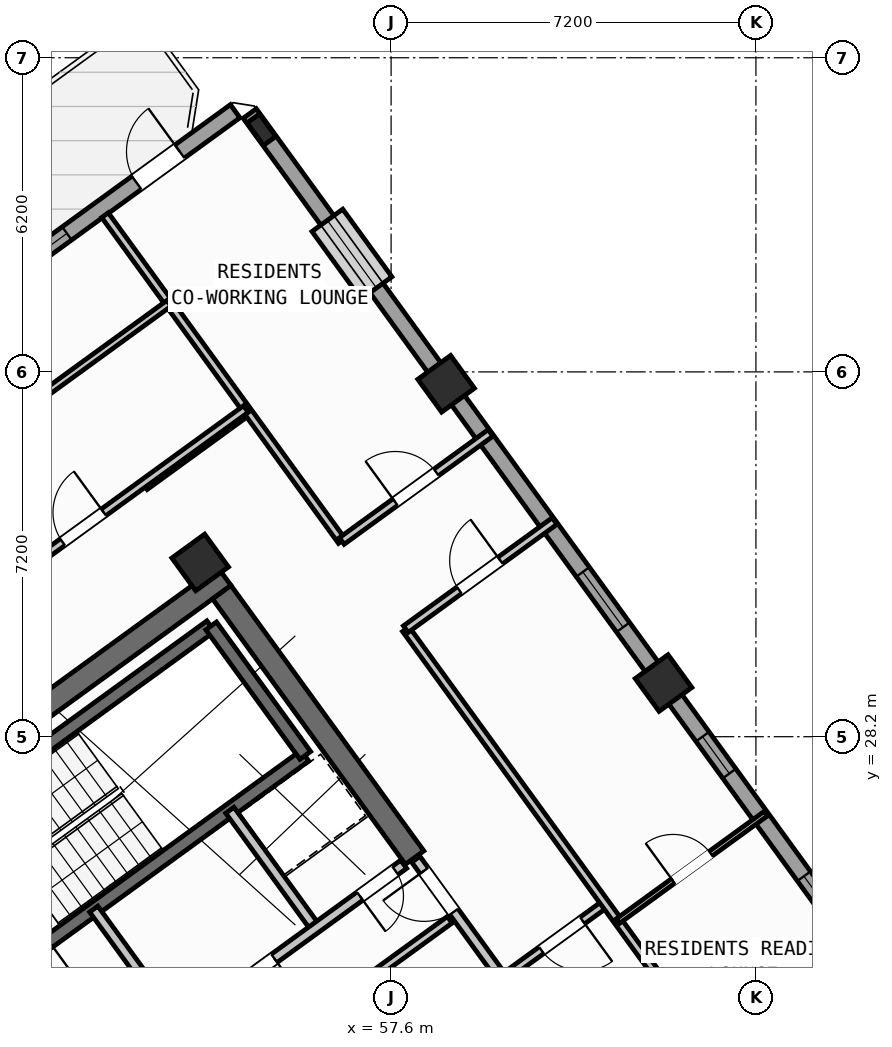
"""IFC4 building model, lengths in metres.
Left out: names, types, materials, properties, quantities, classifications, styles, units other than length and angle.
Written with IfcOpenShell. Run it as: python <this file> out.ifc"""

import sys

from ifc_helpers import new_model, si_unit, direction, frame, frame_2d, origin, origin_2d, place, context, subcontext, project, spatial, rectangle, hollow_rectangle, i_section, extrude, source, transform, mapped, element, fill, save


model = new_model("IFC4")
c1 = context("Model", 3, precision=1e-05, world=origin(), true_north=direction((0.0, 1.0)))
c2 = subcontext(c1, "Body", "Model", "MODEL_VIEW")
j1 = project(units=[si_unit("LENGTHUNIT", "METRE"), si_unit("PLANEANGLEUNIT", "RADIAN")], contexts=[c1])
p1 = place(None, origin())
s1 = spatial("IfcSite", under=j1, at=p1, CompositionType="ELEMENT")
p2 = place(p1, origin())
s2 = spatial("IfcBuilding", under=s1, at=p2, CompositionType="ELEMENT")
p3 = place(p2, frame((0.0, 0.0, 218.4)))
s3 = spatial("IfcBuildingStorey", under=s2, at=p3, CompositionType="ELEMENT", Elevation=218.4)
p4 = place(p3, frame((44.406, 24.172, 0.0), z_axis=(0.0, 0.0, 1.0), x_axis=(0.809012867805, 0.587790931986, 0.0)))
e1 = element("IfcWall", 1, at=p4, inside=s3, PredefinedType="SHEAR", context=c2, shape_type="SweptSolid", body=[
    extrude(rectangle(XDim=12.24, YDim=0.45, at=frame_2d((6.12, 0.0))), origin(), (0.0, 0.0, 1.0), 3.35),
])
p5 = place(p3, frame((58.064, 25.813, 0.0), z_axis=(0.0, 0.0, 1.0), x_axis=(-0.587774812919, 0.809024578921, 0.0)))
e2 = element("IfcWall", 2, at=p5, inside=s3, PredefinedType="SHEAR", context=c2, shape_type="SweptSolid", body=[
    extrude(rectangle(XDim=6.475, YDim=0.45, at=frame_2d((3.238, 0.0))), origin(), (0.0, 0.0, 1.0), 3.35),
])
m1 = source(origin(), c2, "Body", "SweptSolid", [
    extrude(hollow_rectangle(XDim=0.8, YDim=0.8, WallThickness=0.032, at=origin_2d()), origin(), (0.0, 0.0, 1.0), 3.6),
])
for number, where, z_axis, x_axis in (
    (3, (53.832, 31.638, 0.0), (0.0, 0.0, 1.0), (0.809, 0.588, 0.0)),
    (4, (62.977, 29.259, 0.0), (0.0, 0.0, 1.0), (0.809, 0.588, 0.0)),
    (5, (58.686, 35.165, 0.0), (0.0, 0.0, 1.0), (0.809, 0.588, 0.0)),
):
    element("IfcColumn", number, at=place(p3, frame(where, z_axis=z_axis, x_axis=x_axis)), inside=s3, PredefinedType="COLUMN", context=c2, shape_type="MappedRepresentation", body=[
        mapped(m1, transform((0.0, 0.0, 0.0), scale=1.0)),
    ])
m2 = source(origin(), c2, "Body", "SweptSolid", [
    extrude(i_section(OverallWidth=0.3, OverallDepth=0.55, WebThickness=0.015, FlangeThickness=0.029, at=origin_2d()), origin(), (0.0, 0.0, 1.0), 3.6),
])
p6 = place(p3, frame((55.042, 40.181, 0.0), z_axis=(0.0, 0.0, 1.0), x_axis=(0.809016994375, 0.587785252292, 0.0)))
e6 = element("IfcColumn", 6, at=p6, inside=s3, PredefinedType="COLUMN", context=c2, shape_type="MappedRepresentation", body=[
    mapped(m2, transform((0.0, 0.0, 0.0), scale=1.0)),
])
p7 = place(p3, frame((42.207, 31.597, 0.0), z_axis=(0.0, 0.0, 1.0), x_axis=(0.809020333377, 0.587780656523, 0.0)))
e7 = element("IfcWall", 7, at=p7, inside=s3, PredefinedType="STANDARD", context=c2, shape_type="SweptSolid", body=[
    extrude(rectangle(XDim=15.223, YDim=0.32, at=frame_2d((7.611, 0.0))), origin(), (0.0, 0.0, 1.0), 3.35),
])
p8 = place(p7, frame((12.82, 0.0, 0.0)))
e8 = element("IfcOpeningElement", 8, at=p8, cuts=e7, PredefinedType="OPENING", context=c2, shape_type="SweptSolid", body=[
    extrude(rectangle(XDim=1.05, YDim=2.15, at=frame_2d((0.525, 1.075))), frame((0.0, 0.17, 0.0), z_axis=(0.0, -1.0, 0.0), x_axis=(1.0, 0.0, 0.0)), (0.0, 0.0, 1.0), 0.34),
])
p9 = place(p7, frame((1.745, 0.0, 0.9)))
e9 = element("IfcOpeningElement", 9, at=p9, cuts=e7, PredefinedType="OPENING", context=c2, shape_type="SweptSolid", body=[
    extrude(rectangle(XDim=1.65, YDim=1.45, at=frame_2d((0.825, 0.725))), frame((0.0, 0.17, 0.0), z_axis=(0.0, -1.0, 0.0), x_axis=(1.0, 0.0, 0.0)), (0.0, 0.0, 1.0), 0.34),
])
p10 = place(p7, frame((5.985, 0.0, 0.9)))
e10 = element("IfcOpeningElement", 10, at=p10, cuts=e7, PredefinedType="OPENING", context=c2, shape_type="SweptSolid", body=[
    extrude(rectangle(XDim=1.65, YDim=1.45, at=frame_2d((0.825, 0.725))), frame((0.0, 0.17, 0.0), z_axis=(0.0, -1.0, 0.0), x_axis=(1.0, 0.0, 0.0)), (0.0, 0.0, 1.0), 0.34),
])
p11 = place(p7, frame((10.219, 0.0, 1.0)))
e11 = element("IfcOpeningElement", 11, at=p11, cuts=e7, PredefinedType="OPENING", context=c2, shape_type="SweptSolid", body=[
    extrude(rectangle(XDim=0.9, YDim=1.25, at=frame_2d((0.45, 0.625))), frame((0.0, 0.17, 0.0), z_axis=(0.0, -1.0, 0.0), x_axis=(1.0, 0.0, 0.0)), (0.0, 0.0, 1.0), 0.34),
])
p12 = place(p3, frame((54.81, 40.5, 0.0), z_axis=(0.0, 0.0, 1.0), x_axis=(0.587783625747, -0.809018176127, 0.0)))
e12 = element("IfcWall", 12, at=p12, inside=s3, PredefinedType="STANDARD", context=c2, shape_type="SweptSolid", body=[
    extrude(rectangle(XDim=21.587, YDim=0.32, at=frame_2d((10.794, 0.0))), origin(), (0.0, 0.0, 1.0), 2.825),
])
p13 = place(p12, frame((2.606, 0.0, 0.9)))
e13 = element("IfcOpeningElement", 13, at=p13, cuts=e12, PredefinedType="OPENING", context=c2, shape_type="SweptSolid", body=[
    extrude(rectangle(XDim=1.65, YDim=1.45, at=frame_2d((0.825, 0.725))), frame((0.0, 0.17, 0.0), z_axis=(0.0, -1.0, 0.0), x_axis=(1.0, 0.0, 0.0)), (0.0, 0.0, 1.0), 0.34),
])
p14 = place(p12, frame((11.184, 0.0, 0.9)))
e14 = element("IfcOpeningElement", 14, at=p14, cuts=e12, PredefinedType="OPENING", context=c2, shape_type="SweptSolid", body=[
    extrude(rectangle(XDim=1.35, YDim=1.45, at=frame_2d((0.675, 0.725))), frame((0.0, 0.17, 0.0), z_axis=(0.0, -1.0, 0.0), x_axis=(1.0, 0.0, 0.0)), (0.0, 0.0, 1.0), 0.34),
])
p15 = place(p12, frame((15.202, 0.0, 1.0)))
e15 = element("IfcOpeningElement", 15, at=p15, cuts=e12, PredefinedType="OPENING", context=c2, shape_type="SweptSolid", body=[
    extrude(rectangle(XDim=0.9, YDim=1.25, at=frame_2d((0.45, 0.625))), frame((0.0, 0.17, 0.0), z_axis=(0.0, -1.0, 0.0), x_axis=(1.0, 0.0, 0.0)), (0.0, 0.0, 1.0), 0.34),
])
p16 = place(p12, frame((18.607, 0.0, 1.0)))
e16 = element("IfcOpeningElement", 16, at=p16, cuts=e12, PredefinedType="OPENING", context=c2, shape_type="SweptSolid", body=[
    extrude(rectangle(XDim=0.9, YDim=1.25, at=frame_2d((0.45, 0.625))), frame((0.0, 0.17, 0.0), z_axis=(0.0, -1.0, 0.0), x_axis=(1.0, 0.0, 0.0)), (0.0, 0.0, 1.0), 0.34),
])
p17 = place(p3, frame((48.006, 25.996, 0.0), z_axis=(0.0, 0.0, 1.0), x_axis=(0.80901903764, 0.587782439969, 0.0)))
e17 = element("IfcWall", 17, at=p17, inside=s3, PredefinedType="SHEAR", context=c2, shape_type="SweptSolid", body=[
    extrude(rectangle(XDim=7.46, YDim=0.26, at=frame_2d((3.73, 0.0))), origin(), (0.0, 0.0, 1.0), 3.35),
])
p18 = place(p3, frame((49.863, 23.44, 0.0), z_axis=(0.0, 0.0, 1.0), x_axis=(0.809003474932, 0.587803859759, 0.0)))
e18 = element("IfcWall", 18, at=p18, inside=s3, PredefinedType="SHEAR", context=c2, shape_type="SweptSolid", body=[
    extrude(rectangle(XDim=7.46, YDim=0.26, at=frame_2d((3.73, 0.0))), origin(), (0.0, 0.0, 1.0), 3.35),
])
p19 = place(p18, frame((0.36, 0.0, 0.0)))
e19 = element("IfcOpeningElement", 19, at=p19, cuts=e18, PredefinedType="OPENING", context=c2, shape_type="SweptSolid", body=[
    extrude(rectangle(XDim=0.86, YDim=2.05, at=frame_2d((0.43, 1.025))), frame((0.0, 0.14, 0.0), z_axis=(0.0, -1.0, 0.0), x_axis=(1.0, 0.0, 0.0)), (0.0, 0.0, 1.0), 0.28),
])
p20 = place(p3, frame((55.906, 27.831, 0.0), z_axis=(0.0, 0.0, 1.0), x_axis=(-0.587804123638, 0.809003283204, 0.0)))
e20 = element("IfcWall", 20, at=p20, inside=s3, PredefinedType="SHEAR", context=c2, shape_type="SweptSolid", body=[
    extrude(rectangle(XDim=3.16, YDim=0.26, at=frame_2d((1.58, 0.0))), origin(), (0.0, 0.0, 1.0), 3.35),
])
p21 = place(p3, frame((54.421, 21.436, 0.0), z_axis=(0.0, 0.0, 1.0), x_axis=(0.809013710463, 0.587789772183, 0.0)))
e21 = element("IfcWall", 21, at=p21, inside=s3, PredefinedType="PARTITIONING", context=c2, shape_type="SweptSolid", body=[
    extrude(rectangle(XDim=5.36, YDim=0.16, at=frame_2d((2.68, 0.0))), origin(), (0.0, 0.0, 1.0), 3.34),
])
p22 = place(p21, frame((1.4, 0.0, 0.0)))
e22 = element("IfcOpeningElement", 22, at=p22, cuts=e21, PredefinedType="OPENING", context=c2, shape_type="SweptSolid", body=[
    extrude(rectangle(XDim=0.86, YDim=2.05, at=frame_2d((0.43, 1.025))), frame((0.0, 0.09, 0.0), z_axis=(0.0, -1.0, 0.0), x_axis=(1.0, 0.0, 0.0)), (0.0, 0.0, 1.0), 0.18),
])
p23 = place(p3, frame((53.425, 22.468, 0.0), z_axis=(0.0, 0.0, 1.0), x_axis=(-0.5877230039, 0.809062216821, 0.0)))
e23 = element("IfcWall", 23, at=p23, inside=s3, PredefinedType="STANDARD", context=c2, shape_type="SweptSolid", body=[
    extrude(rectangle(XDim=2.88, YDim=0.2, at=frame_2d((1.44, 0.0))), origin(), (0.0, 0.0, 1.0), 3.34),
])
p24 = place(p3, frame((56.111, 24.419, 0.0), z_axis=(0.0, 0.0, 1.0), x_axis=(-0.58777848983, 0.809021907548, 0.0)))
e24 = element("IfcWall", 24, at=p24, inside=s3, PredefinedType="STANDARD", context=c2, shape_type="SweptSolid", body=[
    extrude(rectangle(XDim=2.88, YDim=0.2, at=frame_2d((1.44, 0.0))), origin(), (0.0, 0.0, 1.0), 3.34),
])
p25 = place(p3, frame((53.425, 22.468, 0.0), z_axis=(0.0, 0.0, 1.0), x_axis=(0.809015945709, 0.587786695655, 0.0)))
e25 = element("IfcWall", 25, at=p25, inside=s3, PredefinedType="STANDARD", context=c2, shape_type="SweptSolid", body=[
    extrude(rectangle(XDim=5.468, YDim=0.2, at=frame_2d((2.734, 0.0))), origin(), (0.0, 0.0, 1.0), 3.34),
])
p26 = place(p25, frame((4.4, 0.0, 0.0)))
e26 = element("IfcOpeningElement", 26, at=p26, cuts=e25, PredefinedType="OPENING", context=c2, shape_type="SweptSolid", body=[
    extrude(rectangle(XDim=0.86, YDim=2.05, at=frame_2d((0.43, 1.025))), frame((0.0, 0.11, 0.0), z_axis=(0.0, -1.0, 0.0), x_axis=(1.0, 0.0, 0.0)), (0.0, 0.0, 1.0), 0.22),
])
p27 = place(p25, frame((1.45, 0.0, 0.0)))
e27 = element("IfcOpeningElement", 27, at=p27, cuts=e25, PredefinedType="OPENING", context=c2, shape_type="SweptSolid", body=[
    extrude(rectangle(XDim=0.86, YDim=2.05, at=frame_2d((0.43, 1.025))), frame((0.0, 0.11, 0.0), z_axis=(0.0, -1.0, 0.0), x_axis=(1.0, 0.0, 0.0)), (0.0, 0.0, 1.0), 0.22),
])
p28 = place(p3, frame((59.827, 23.386, 0.0), z_axis=(0.0, 0.0, 1.0), x_axis=(-0.587803840107, 0.809003489211, 0.0)))
e28 = element("IfcWall", 28, at=p28, inside=s3, PredefinedType="STANDARD", context=c2, shape_type="SweptSolid", body=[
    extrude(rectangle(XDim=2.96, YDim=0.2, at=frame_2d((1.48, 0.0))), origin(), (0.0, 0.0, 1.0), 3.34),
])
p29 = place(p28, frame((1.68, 0.0, 0.0)))
e29 = element("IfcOpeningElement", 29, at=p29, cuts=e28, PredefinedType="OPENING", context=c2, shape_type="SweptSolid", body=[
    extrude(rectangle(XDim=1.0, YDim=2.1, at=frame_2d((0.5, 1.05))), frame((0.0, 0.11, 0.0), z_axis=(0.0, -1.0, 0.0), x_axis=(1.0, 0.0, 0.0)), (0.0, 0.0, 1.0), 0.22),
])
p30 = place(p3, frame((59.798, 23.427, 0.0), z_axis=(0.0, 0.0, 1.0), x_axis=(0.809034604122, 0.587761013791, 0.0)))
e30 = element("IfcWall", 30, at=p30, inside=s3, PredefinedType="PARTITIONING", context=c2, shape_type="SweptSolid", body=[
    extrude(rectangle(XDim=2.51, YDim=0.16, at=frame_2d((1.255, 0.0))), origin(), (0.0, 0.0, 1.0), 3.34),
])
p31 = place(p30, frame((0.95, 0.0, 0.0)))
e31 = element("IfcOpeningElement", 31, at=p31, cuts=e30, PredefinedType="OPENING", context=c2, shape_type="SweptSolid", body=[
    extrude(rectangle(XDim=1.0, YDim=2.1, at=frame_2d((0.5, 1.05))), frame((0.0, 0.09, 0.0), z_axis=(0.0, -1.0, 0.0), x_axis=(1.0, 0.0, 0.0)), (0.0, 0.0, 1.0), 0.18),
])
p32 = place(p3, frame((52.739, 33.143, 0.0), z_axis=(0.0, 0.0, 1.0), x_axis=(0.809000999347, 0.58780726693, 0.0)))
e32 = element("IfcWall", 32, at=p32, inside=s3, PredefinedType="PARTITIONING", context=c2, shape_type="SweptSolid", body=[
    extrude(rectangle(XDim=2.51, YDim=0.16, at=frame_2d((1.255, 0.0))), origin(), (0.0, 0.0, 1.0), 3.34),
])
p33 = place(p3, frame((64.709, 20.938, 0.0), z_axis=(0.0, 0.0, 1.0), x_axis=(-0.587781191743, 0.809019944521, 0.0)))
e33 = element("IfcWall", 33, at=p33, inside=s3, PredefinedType="PARTITIONING", context=c2, shape_type="SweptSolid", body=[
    extrude(rectangle(XDim=11.6, YDim=0.16, at=frame_2d((5.8, 0.0))), origin(), (0.0, 0.0, 1.0), 3.34),
])
p34 = place(p3, frame((56.627, 32.062, 0.0), z_axis=(0.0, 0.0, 1.0), x_axis=(-0.587769918433, 0.809028134854, 0.0)))
e34 = element("IfcWall", 34, at=p34, inside=s3, PredefinedType="PARTITIONING", context=c2, shape_type="SweptSolid", body=[
    extrude(rectangle(XDim=7.95, YDim=0.16, at=frame_2d((3.975, 0.0))), origin(), (0.0, 0.0, 1.0), 3.34),
])
p35 = place(p3, frame((57.89, 30.323, 0.0), z_axis=(0.0, 0.0, 1.0), x_axis=(0.809035546126, 0.58775971715, 0.0)))
e35 = element("IfcWall", 35, at=p35, inside=s3, PredefinedType="PARTITIONING", context=c2, shape_type="SweptSolid", body=[
    extrude(rectangle(XDim=3.63, YDim=0.16, at=frame_2d((1.815, 0.0))), origin(), (0.0, 0.0, 1.0), 3.34),
])
p36 = place(p35, frame((1.305, 0.0, 0.0)))
e36 = element("IfcOpeningElement", 36, at=p36, cuts=e35, PredefinedType="OPENING", context=c2, shape_type="SweptSolid", body=[
    extrude(rectangle(XDim=1.0, YDim=2.1, at=frame_2d((0.5, 1.05))), frame((0.0, 0.09, 0.0), z_axis=(0.0, -1.0, 0.0), x_axis=(1.0, 0.0, 0.0)), (0.0, 0.0, 1.0), 0.18),
])
p37 = place(p3, frame((56.627, 32.062, 0.0), z_axis=(0.0, 0.0, 1.0), x_axis=(0.809003564202, 0.587803736896, 0.0)))
e37 = element("IfcWall", 37, at=p37, inside=s3, PredefinedType="PARTITIONING", context=c2, shape_type="SweptSolid", body=[
    extrude(rectangle(XDim=3.63, YDim=0.16, at=frame_2d((1.815, 0.0))), origin(), (0.0, 0.0, 1.0), 3.34),
])
p38 = place(p37, frame((1.305, 0.0, 0.0)))
e38 = element("IfcOpeningElement", 38, at=p38, cuts=e37, PredefinedType="OPENING", context=c2, shape_type="SweptSolid", body=[
    extrude(rectangle(XDim=1.0, YDim=2.1, at=frame_2d((0.5, 1.05))), frame((0.0, 0.09, 0.0), z_axis=(0.0, -1.0, 0.0), x_axis=(1.0, 0.0, 0.0)), (0.0, 0.0, 1.0), 0.18),
])
p39 = place(p3, frame((62.077, 24.561, 0.0), z_axis=(0.0, 0.0, 1.0), x_axis=(0.809005039917, 0.58780170584, 0.0)))
e39 = element("IfcWall", 39, at=p39, inside=s3, PredefinedType="PARTITIONING", context=c2, shape_type="SweptSolid", body=[
    extrude(rectangle(XDim=3.61, YDim=0.11, at=frame_2d((1.805, 0.0))), origin(), (0.0, 0.0, 1.0), 3.34),
])
p40 = place(p39, frame((1.345, 0.0, 0.0)))
e40 = element("IfcOpeningElement", 40, at=p40, cuts=e39, PredefinedType="OPENING", context=c2, shape_type="SweptSolid", body=[
    extrude(rectangle(XDim=0.92, YDim=2.08, at=frame_2d((0.46, 1.04))), frame((0.0, 0.065, 0.0), z_axis=(0.0, -1.0, 0.0), x_axis=(1.0, 0.0, 0.0)), (0.0, 0.0, 1.0), 0.13),
])
p41 = place(p3, frame((42.866, 26.044, 0.0), z_axis=(0.0, 0.0, 1.0), x_axis=(0.809020254154, 0.587780765566, 0.0)))
e41 = element("IfcWall", 41, at=p41, inside=s3, PredefinedType="PARTITIONING", context=c2, shape_type="SweptSolid", body=[
    extrude(rectangle(XDim=14.67, YDim=0.16, at=frame_2d((7.335, 0.0))), origin(), (0.0, 0.0, 1.0), 3.34),
])
p42 = place(p41, frame((10.2, 0.0, 0.0)))
e42 = element("IfcOpeningElement", 42, at=p42, cuts=e41, PredefinedType="OPENING", context=c2, shape_type="SweptSolid", body=[
    extrude(rectangle(XDim=1.0, YDim=2.1, at=frame_2d((0.5, 1.05))), frame((0.0, 0.09, 0.0), z_axis=(0.0, -1.0, 0.0), x_axis=(1.0, 0.0, 0.0)), (0.0, 0.0, 1.0), 0.18),
])
p43 = place(p3, frame((42.377, 28.878, 0.0), z_axis=(0.0, 0.0, 1.0), x_axis=(0.809020411523, 0.587780548963, 0.0)))
e43 = element("IfcWall", 43, at=p43, inside=s3, PredefinedType="PLUMBINGWALL", context=c2, shape_type="SweptSolid", body=[
    extrude(rectangle(XDim=13.4, YDim=0.14, at=frame_2d((6.7, 0.0))), origin(), (0.0, 0.0, 1.0), 3.34),
])
p44 = place(p43, frame((8.94, 0.0, 0.0)))
e44 = element("IfcOpeningElement", 44, at=p44, cuts=e43, PredefinedType="OPENING", context=c2, shape_type="SweptSolid", body=[
    extrude(rectangle(XDim=0.92, YDim=2.08, at=frame_2d((0.46, 1.04))), frame((0.0, 0.08, 0.0), z_axis=(0.0, -1.0, 0.0), x_axis=(1.0, 0.0, 0.0)), (0.0, 0.0, 1.0), 0.16),
])
m3 = source(origin(), c2, "Body", "SweptSolid", [
    extrude(rectangle(XDim=1.05, YDim=2.15, at=frame_2d((0.525, 1.075))), frame((0.0, 0.025, 0.0), z_axis=(0.0, -1.0, 0.0), x_axis=(1.0, 0.0, 0.0)), (0.0, 0.0, 1.0), 0.05),
])
p45 = place(p8, origin())
e45 = element("IfcDoor", 45, at=p45, inside=s3, OperationType="SINGLE_SWING_RIGHT", PredefinedType="DOOR", context=c2, shape_type="MappedRepresentation", body=[
    mapped(m3, transform((0.0, 0.0, 0.0), scale=1.0)),
])
fill(e8, e45)
m4 = source(origin(), c2, "Body", "SweptSolid", [
    extrude(rectangle(XDim=0.9, YDim=1.25, at=frame_2d((0.45, 0.625))), frame((0.0, 0.03, 0.0), z_axis=(0.0, -1.0, 0.0), x_axis=(1.0, 0.0, 0.0)), (0.0, 0.0, 1.0), 0.06),
])
p46 = place(p11, origin())
e46 = element("IfcWindow", 46, at=p46, inside=s3, PartitioningType="SINGLE_PANEL", PredefinedType="WINDOW", context=c2, shape_type="MappedRepresentation", body=[
    mapped(m4, transform((0.0, 0.0, 0.0), scale=1.0)),
])
fill(e11, e46)
m5 = source(origin(), c2, "Body", "SweptSolid", [
    extrude(rectangle(XDim=1.65, YDim=1.45, at=frame_2d((0.825, 0.725))), frame((0.0, 0.03, 0.0), z_axis=(0.0, -1.0, 0.0), x_axis=(1.0, 0.0, 0.0)), (0.0, 0.0, 1.0), 0.06),
])
p47 = place(p13, origin())
e47 = element("IfcWindow", 47, at=p47, inside=s3, PartitioningType="SINGLE_PANEL", PredefinedType="WINDOW", context=c2, shape_type="MappedRepresentation", body=[
    mapped(m5, transform((0.0, 0.0, 0.0), scale=1.0)),
])
fill(e13, e47)
m6 = source(origin(), c2, "Body", "SweptSolid", [
    extrude(rectangle(XDim=1.35, YDim=1.45, at=frame_2d((0.675, 0.725))), frame((0.0, 0.03, 0.0), z_axis=(0.0, -1.0, 0.0), x_axis=(1.0, 0.0, 0.0)), (0.0, 0.0, 1.0), 0.06),
])
p48 = place(p14, origin())
e48 = element("IfcWindow", 48, at=p48, inside=s3, PartitioningType="SINGLE_PANEL", PredefinedType="WINDOW", context=c2, shape_type="MappedRepresentation", body=[
    mapped(m6, transform((0.0, 0.0, 0.0), scale=1.0)),
])
fill(e14, e48)
p49 = place(p15, origin())
e49 = element("IfcWindow", 49, at=p49, inside=s3, PartitioningType="SINGLE_PANEL", PredefinedType="WINDOW", context=c2, shape_type="MappedRepresentation", body=[
    mapped(m4, transform((0.0, 0.0, 0.0), scale=1.0)),
])
fill(e15, e49)
p50 = place(p16, origin())
e50 = element("IfcWindow", 50, at=p50, inside=s3, PartitioningType="SINGLE_PANEL", PredefinedType="WINDOW", context=c2, shape_type="MappedRepresentation", body=[
    mapped(m4, transform((0.0, 0.0, 0.0), scale=1.0)),
])
fill(e16, e50)
m7 = source(origin(), c2, "Body", "SweptSolid", [
    extrude(rectangle(XDim=0.86, YDim=2.05, at=frame_2d((0.43, 1.025))), frame((0.0, 0.025, 0.0), z_axis=(0.0, -1.0, 0.0), x_axis=(1.0, 0.0, 0.0)), (0.0, 0.0, 1.0), 0.05),
])
p51 = place(p26, frame((0.86, 0.0, 0.0), z_axis=(0.0, 0.0, 1.0), x_axis=(-1.0, 0.0, 0.0)))
e51 = element("IfcDoor", 51, at=p51, inside=s3, OperationType="SINGLE_SWING_RIGHT", PredefinedType="DOOR", context=c2, shape_type="MappedRepresentation", body=[
    mapped(m7, transform((0.0, 0.0, 0.0), scale=1.0)),
])
fill(e26, e51)
p52 = place(p27, frame((0.86, 0.0, 0.0), z_axis=(0.0, 0.0, 1.0), x_axis=(-1.0, 0.0, 0.0)))
e52 = element("IfcDoor", 52, at=p52, inside=s3, OperationType="SINGLE_SWING_LEFT", PredefinedType="DOOR", context=c2, shape_type="MappedRepresentation", body=[
    mapped(m7, transform((0.0, 0.0, 0.0), scale=1.0)),
])
fill(e27, e52)
m8 = source(origin(), c2, "Body", "SweptSolid", [
    extrude(rectangle(XDim=1.0, YDim=2.1, at=frame_2d((0.5, 1.05))), frame((0.0, 0.025, 0.0), z_axis=(0.0, -1.0, 0.0), x_axis=(1.0, 0.0, 0.0)), (0.0, 0.0, 1.0), 0.05),
])
p53 = place(p31, frame((1.0, 0.0, 0.0), z_axis=(0.0, 0.0, 1.0), x_axis=(-1.0, 0.0, 0.0)))
e53 = element("IfcDoor", 53, at=p53, inside=s3, OperationType="SINGLE_SWING_LEFT", PredefinedType="DOOR", context=c2, shape_type="MappedRepresentation", body=[
    mapped(m8, transform((0.0, 0.0, 0.0), scale=1.0)),
])
fill(e31, e53)
p54 = place(p29, origin())
e54 = element("IfcDoor", 54, at=p54, inside=s3, OperationType="SINGLE_SWING_RIGHT", PredefinedType="DOOR", context=c2, shape_type="MappedRepresentation", body=[
    mapped(m8, transform((0.0, 0.0, 0.0), scale=1.0)),
])
fill(e29, e54)
p55 = place(p38, origin())
e55 = element("IfcDoor", 55, at=p55, inside=s3, OperationType="SINGLE_SWING_LEFT", PredefinedType="DOOR", context=c2, shape_type="MappedRepresentation", body=[
    mapped(m8, transform((0.0, 0.0, 0.0), scale=1.0)),
])
fill(e38, e55)
p56 = place(p36, origin())
e56 = element("IfcDoor", 56, at=p56, inside=s3, OperationType="SINGLE_SWING_RIGHT", PredefinedType="DOOR", context=c2, shape_type="MappedRepresentation", body=[
    mapped(m8, transform((0.0, 0.0, 0.0), scale=1.0)),
])
fill(e36, e56)
m9 = source(origin(), c2, "Body", "SweptSolid", [
    extrude(rectangle(XDim=0.92, YDim=2.08, at=frame_2d((0.46, 1.04))), frame((0.0, 0.025, 0.0), z_axis=(0.0, -1.0, 0.0), x_axis=(1.0, 0.0, 0.0)), (0.0, 0.0, 1.0), 0.05),
])
p57 = place(p40, origin())
e57 = element("IfcDoor", 57, at=p57, inside=s3, OperationType="SINGLE_SWING_LEFT", PredefinedType="DOOR", context=c2, shape_type="MappedRepresentation", body=[
    mapped(m9, transform((0.0, 0.0, 0.0), scale=1.0)),
])
fill(e40, e57)
p58 = place(p42, origin())
e58 = element("IfcDoor", 58, at=p58, inside=s3, OperationType="SINGLE_SWING_RIGHT", PredefinedType="DOOR", context=c2, shape_type="MappedRepresentation", body=[
    mapped(m8, transform((0.0, 0.0, 0.0), scale=1.0)),
])
fill(e42, e58)
save(model, sys.argv[1])
